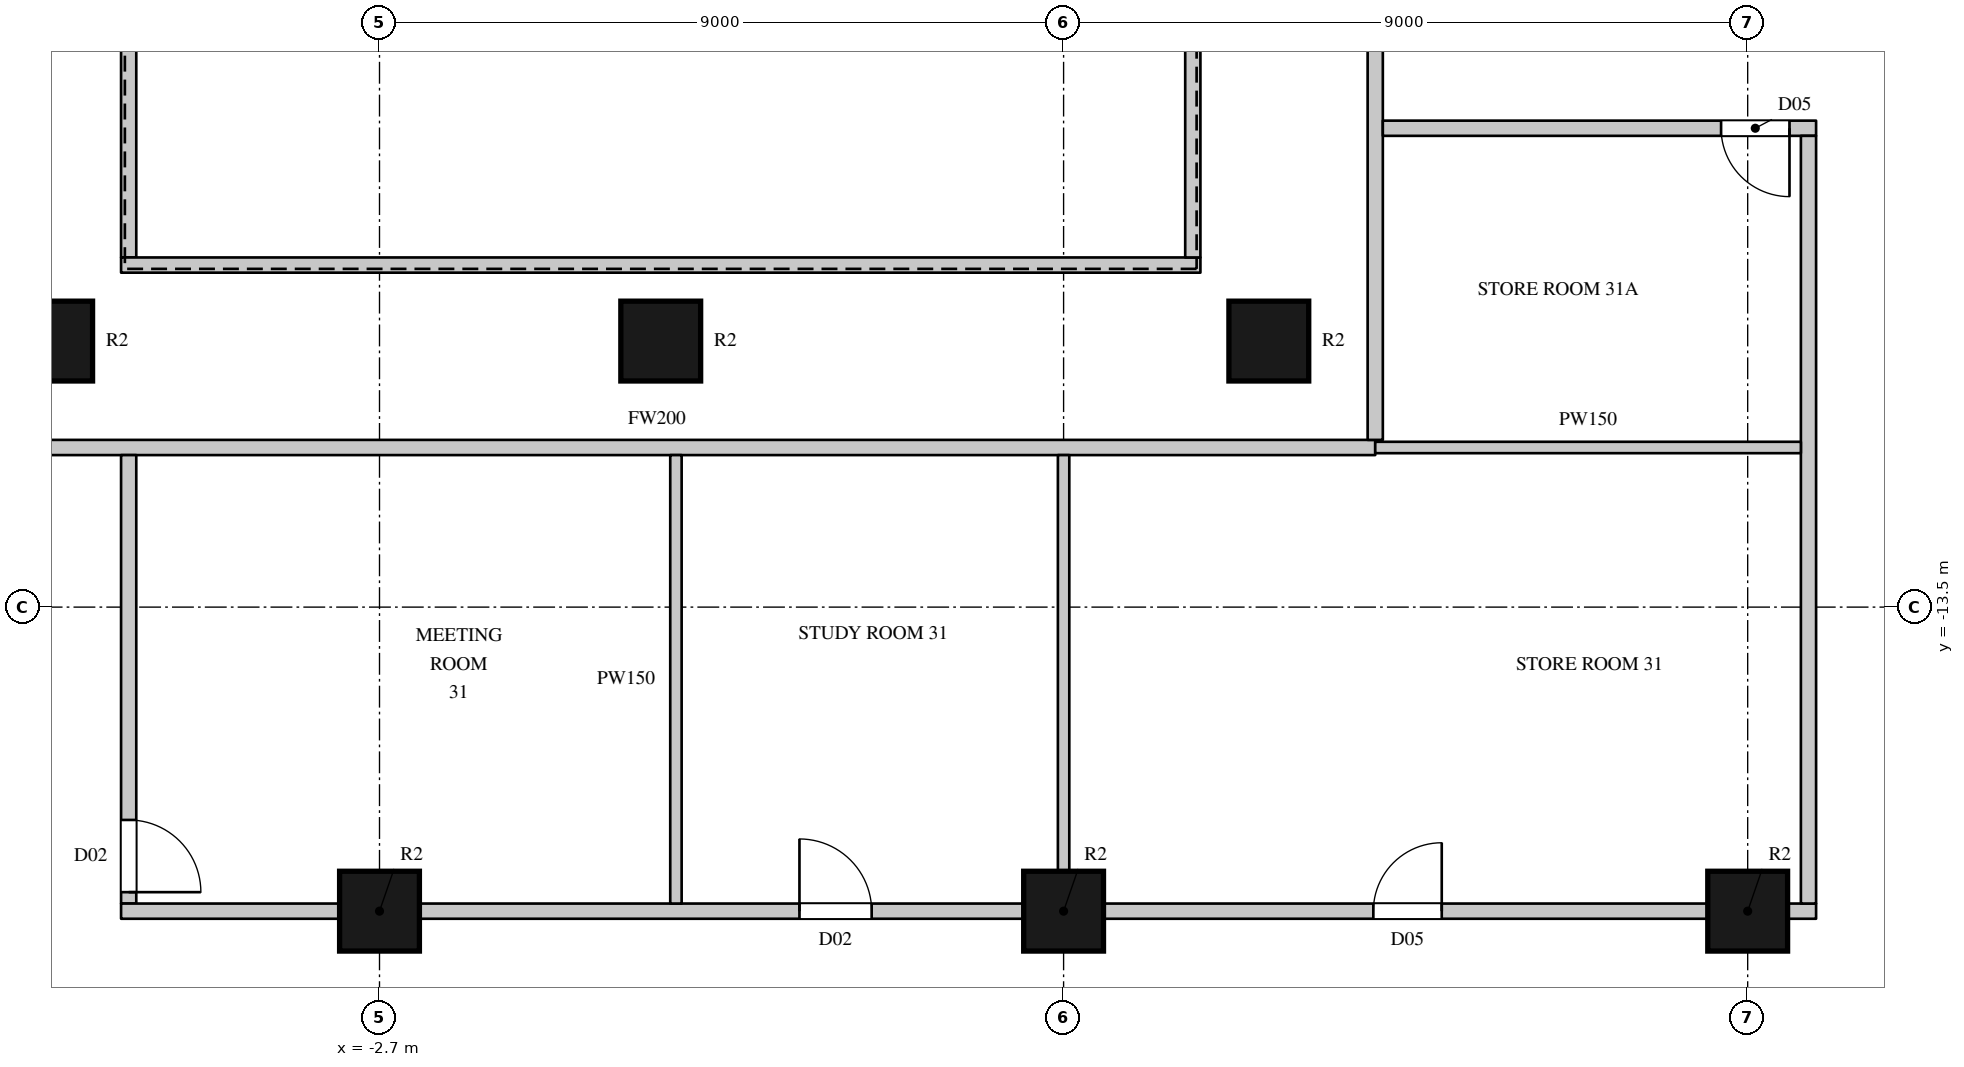
"""IFC4 building model, lengths in metres.
Left out: names, types, materials, properties, quantities, classifications, styles, units other than length and angle.
Written with IfcOpenShell. Run it as: python <this file> out.ifc"""

import sys

from ifc_helpers import new_model, si_unit, direction, frame, frame_2d, origin, origin_2d, place, context, subcontext, project, spatial, rectangle, circle, extrude, element, fill, save


model = new_model("IFC4")
c1 = context("Model", 3, precision=1e-05, world=origin(), true_north=direction((0.0, 1.0)))
c2 = subcontext(c1, "Body", "Model", "MODEL_VIEW")
j1 = project(units=[si_unit("LENGTHUNIT", "METRE"), si_unit("PLANEANGLEUNIT", "RADIAN")], contexts=[c1])
p1 = place(None, origin())
s1 = spatial("IfcSite", under=j1, at=p1, CompositionType="ELEMENT")
p2 = place(p1, origin())
s2 = spatial("IfcBuilding", under=s1, at=p2, CompositionType="ELEMENT")
p3 = place(p2, frame((0.0, 0.0, 141.9)))
s3 = spatial("IfcBuildingStorey", under=s2, at=p3, CompositionType="ELEMENT", Elevation=141.9)
for number, where, z_axis, x_axis in (
    (1, (-2.7, -17.5, 0.0), (0.0, 0.0, 1.0), (1.0, 0.0, 0.0)),
    (2, (6.3, -17.5, 0.0), (0.0, 0.0, 1.0), (1.0, 0.0, 0.0)),
    (3, (15.3, -17.5, 0.0), (0.0, 0.0, 1.0), (1.0, 0.0, 0.0)),
    (4, (-7.0, -10.0, 0.0), (0.0, 0.0, 1.0), (1.0, 0.0, 0.0)),
    (5, (1.0, -10.0, 0.0), (0.0, 0.0, 1.0), (1.0, 0.0, 0.0)),
    (6, (9.0, -10.0, 0.0), (0.0, 0.0, 1.0), (1.0, 0.0, 0.0)),
):
    element("IfcColumn", number, at=place(p3, frame(where, z_axis=z_axis, x_axis=x_axis)), inside=s3, PredefinedType="COLUMN", context=c2, shape_type="SweptSolid", body=[
        extrude(circle(Radius=0.525, at=origin_2d()), origin(), (0.0, 0.0, 1.0), 3.6),
    ])
p4 = place(p3, frame((-8.5, -11.4, 0.0), z_axis=(0.0, 0.0, 1.0), x_axis=(1.0, 0.0, 0.0)))
e7 = element("IfcWall", 7, at=p4, inside=s3, PredefinedType="PARTITIONING", context=c2, shape_type="SweptSolid", body=[
    extrude(rectangle(XDim=18.9, YDim=0.2, at=frame_2d((9.45, 0.0))), origin(), (0.0, 0.0, 1.0), 3.3),
])
p5 = place(p3, frame((-6.0, -17.4, 0.0), z_axis=(0.0, 0.0, 1.0), x_axis=(0.0, 1.0, 0.0)))
e8 = element("IfcWall", 8, at=p5, inside=s3, PredefinedType="PARTITIONING", context=c2, shape_type="SweptSolid", body=[
    extrude(rectangle(XDim=5.9, YDim=0.2, at=frame_2d((2.95, 0.0))), origin(), (0.0, 0.0, 1.0), 3.3),
])
p6 = place(p5, frame((0.15, 0.0, 0.0)))
e9 = element("IfcOpeningElement", 9, at=p6, cuts=e8, PredefinedType="OPENING", context=c2, shape_type="SweptSolid", body=[
    extrude(rectangle(XDim=0.95, YDim=2.2, at=frame_2d((0.475, 1.1))), frame((0.0, 0.11, 0.0), z_axis=(0.0, -1.0, 0.0), x_axis=(1.0, 0.0, 0.0)), (0.0, 0.0, 1.0), 0.22),
])
p7 = place(p3, frame((-6.1, -17.5, 0.0), z_axis=(0.0, 0.0, 1.0), x_axis=(1.0, 0.0, 0.0)))
e10 = element("IfcWall", 10, at=p7, inside=s3, PredefinedType="PARTITIONING", context=c2, shape_type="SweptSolid", body=[
    extrude(rectangle(XDim=2.875, YDim=0.2, at=frame_2d((1.438, 0.0))), origin(), (0.0, 0.0, 1.0), 2.75),
])
p8 = place(p3, frame((-2.175, -17.5, 0.0), z_axis=(0.0, 0.0, 1.0), x_axis=(1.0, 0.0, 0.0)))
e11 = element("IfcWall", 11, at=p8, inside=s3, PredefinedType="PARTITIONING", context=c2, shape_type="SweptSolid", body=[
    extrude(rectangle(XDim=7.95, YDim=0.2, at=frame_2d((3.975, 0.0))), origin(), (0.0, 0.0, 1.0), 2.75),
])
p9 = place(p8, frame((5.0, 0.0, 0.0)))
e12 = element("IfcOpeningElement", 12, at=p9, cuts=e11, PredefinedType="OPENING", context=c2, shape_type="SweptSolid", body=[
    extrude(rectangle(XDim=0.95, YDim=2.2, at=frame_2d((0.475, 1.1))), frame((0.0, 0.11, 0.0), z_axis=(0.0, -1.0, 0.0), x_axis=(1.0, 0.0, 0.0)), (0.0, 0.0, 1.0), 0.22),
])
p10 = place(p3, frame((6.825, -17.5, 0.0), z_axis=(0.0, 0.0, 1.0), x_axis=(1.0, 0.0, 0.0)))
e13 = element("IfcWall", 13, at=p10, inside=s3, PredefinedType="PARTITIONING", context=c2, shape_type="SweptSolid", body=[
    extrude(rectangle(XDim=7.95, YDim=0.2, at=frame_2d((3.975, 0.0))), origin(), (0.0, 0.0, 1.0), 2.75),
])
p11 = place(p10, frame((3.55, 0.0, 0.0)))
e14 = element("IfcOpeningElement", 14, at=p11, cuts=e13, PredefinedType="OPENING", context=c2, shape_type="SweptSolid", body=[
    extrude(rectangle(XDim=0.9, YDim=2.2, at=frame_2d((0.45, 1.1))), frame((0.0, 0.11, 0.0), z_axis=(0.0, -1.0, 0.0), x_axis=(1.0, 0.0, 0.0)), (0.0, 0.0, 1.0), 0.22),
])
p12 = place(p3, frame((15.825, -17.5, 0.0), z_axis=(0.0, 0.0, 1.0), x_axis=(1.0, 0.0, 0.0)))
e15 = element("IfcWall", 15, at=p12, inside=s3, PredefinedType="PARTITIONING", context=c2, shape_type="SweptSolid", body=[
    extrude(rectangle(XDim=0.375, YDim=0.2, at=frame_2d((0.188, 0.0))), origin(), (0.0, 0.0, 1.0), 3.3),
])
p13 = place(p3, frame((-6.0, -8.9, 0.0), z_axis=(0.0, 0.0, 1.0), x_axis=(0.0, 1.0, 0.0)))
e16 = element("IfcWall", 16, at=p13, inside=s3, PredefinedType="PARTITIONING", context=c2, shape_type="SweptSolid", body=[
    extrude(rectangle(XDim=17.8, YDim=0.2, at=frame_2d((8.9, 0.0))), origin(), (0.0, 0.0, 1.0), 3.3),
])
p14 = place(p3, frame((-6.1, -9.0, 0.0), z_axis=(0.0, 0.0, 1.0), x_axis=(1.0, 0.0, 0.0)))
e17 = element("IfcWall", 17, at=p14, inside=s3, PredefinedType="PARTITIONING", context=c2, shape_type="SweptSolid", body=[
    extrude(rectangle(XDim=14.2, YDim=0.2, at=frame_2d((7.1, 0.0))), origin(), (0.0, 0.0, 1.0), 3.3),
])
p15 = place(p3, frame((8.0, -8.9, 0.0), z_axis=(0.0, 0.0, 1.0), x_axis=(0.0, 1.0, 0.0)))
e18 = element("IfcWall", 18, at=p15, inside=s3, PredefinedType="PARTITIONING", context=c2, shape_type="SweptSolid", body=[
    extrude(rectangle(XDim=17.8, YDim=0.2, at=frame_2d((8.9, 0.0))), origin(), (0.0, 0.0, 1.0), 3.3),
])
p16 = place(p3, frame((10.4, -11.3, 0.0), z_axis=(0.0, 0.0, 1.0), x_axis=(0.0, 1.0, 0.0)))
e19 = element("IfcWall", 19, at=p16, inside=s3, PredefinedType="PARTITIONING", context=c2, shape_type="SweptSolid", body=[
    extrude(rectangle(XDim=18.045, YDim=0.2, at=frame_2d((9.022, 0.0))), origin(), (0.0, 0.0, 1.0), 3.3),
])
p17 = place(p16, frame((16.3, 0.0, 0.0)))
e20 = element("IfcOpeningElement", 20, at=p17, cuts=e19, PredefinedType="OPENING", context=c2, shape_type="SweptSolid", body=[
    extrude(rectangle(XDim=1.5, YDim=2.2, at=frame_2d((0.75, 1.1))), frame((0.0, 0.11, 0.0), z_axis=(0.0, -1.0, 0.0), x_axis=(1.0, 0.0, 0.0)), (0.0, 0.0, 1.0), 0.22),
])
p18 = place(p16, frame((14.65, 0.0, 0.0)))
e21 = element("IfcOpeningElement", 21, at=p18, cuts=e19, PredefinedType="OPENING", context=c2, shape_type="SweptSolid", body=[
    extrude(rectangle(XDim=1.5, YDim=2.2, at=frame_2d((0.75, 1.1))), frame((0.0, 0.11, 0.0), z_axis=(0.0, -1.0, 0.0), x_axis=(1.0, 0.0, 0.0)), (0.0, 0.0, 1.0), 0.22),
])
p19 = place(p16, frame((9.1, 0.0, 0.0)))
e22 = element("IfcOpeningElement", 22, at=p19, cuts=e19, PredefinedType="OPENING", context=c2, shape_type="SweptSolid", body=[
    extrude(rectangle(XDim=1.5, YDim=2.2, at=frame_2d((0.75, 1.1))), frame((0.0, 0.11, 0.0), z_axis=(0.0, -1.0, 0.0), x_axis=(1.0, 0.0, 0.0)), (0.0, 0.0, 1.0), 0.22),
])
p20 = place(p3, frame((10.5, -7.2, 0.0), z_axis=(0.0, 0.0, 1.0), x_axis=(1.0, 0.0, 0.0)))
e23 = element("IfcWall", 23, at=p20, inside=s3, PredefinedType="PARTITIONING", context=c2, shape_type="SweptSolid", body=[
    extrude(rectangle(XDim=5.7, YDim=0.2, at=frame_2d((2.85, 0.0))), origin(), (0.0, 0.0, 1.0), 3.3),
])
p21 = place(p20, frame((4.45, 0.0, 0.0)))
e24 = element("IfcOpeningElement", 24, at=p21, cuts=e23, PredefinedType="OPENING", context=c2, shape_type="SweptSolid", body=[
    extrude(rectangle(XDim=0.9, YDim=2.2, at=frame_2d((0.45, 1.1))), frame((0.0, 0.11, 0.0), z_axis=(0.0, -1.0, 0.0), x_axis=(1.0, 0.0, 0.0)), (0.0, 0.0, 1.0), 0.22),
])
p22 = place(p3, frame((16.1, -17.4, 0.0), z_axis=(0.0, 0.0, 1.0), x_axis=(0.0, 1.0, 0.0)))
e25 = element("IfcWall", 25, at=p22, inside=s3, PredefinedType="PARTITIONING", context=c2, shape_type="SweptSolid", body=[
    extrude(rectangle(XDim=10.1, YDim=0.2, at=frame_2d((5.05, 0.0))), origin(), (0.0, 0.0, 1.0), 3.3),
])
p23 = place(p3, frame((1.2, -17.4, 0.0), z_axis=(0.0, 0.0, 1.0), x_axis=(0.0, 1.0, 0.0)))
e26 = element("IfcWall", 26, at=p23, inside=s3, PredefinedType="PARTITIONING", context=c2, shape_type="SweptSolid", body=[
    extrude(rectangle(XDim=5.9, YDim=0.15, at=frame_2d((2.95, 0.0))), origin(), (0.0, 0.0, 1.0), 3.3),
])
p24 = place(p3, frame((6.3, -16.975, 0.0), z_axis=(0.0, 0.0, 1.0), x_axis=(0.0, 1.0, 0.0)))
e27 = element("IfcWall", 27, at=p24, inside=s3, PredefinedType="PARTITIONING", context=c2, shape_type="SweptSolid", body=[
    extrude(rectangle(XDim=5.475, YDim=0.15, at=frame_2d((2.738, 0.0))), origin(), (0.0, 0.0, 1.0), 2.75),
])
p25 = place(p3, frame((10.4, -11.4, 0.0), z_axis=(0.0, 0.0, 1.0), x_axis=(1.0, 0.0, 0.0)))
e28 = element("IfcWall", 28, at=p25, inside=s3, PredefinedType="PARTITIONING", context=c2, shape_type="SweptSolid", body=[
    extrude(rectangle(XDim=5.6, YDim=0.15, at=frame_2d((2.8, 0.0))), origin(), (0.0, 0.0, 1.0), 3.3),
])
p26 = place(p6, origin())
e29 = element("IfcDoor", 29, at=p26, inside=s3, OperationType="SINGLE_SWING_RIGHT", PredefinedType="DOOR", context=c2, shape_type="SweptSolid", body=[
    extrude(rectangle(XDim=0.95, YDim=2.2, at=frame_2d((0.475, 1.1))), frame((0.0, 0.025, 0.0), z_axis=(0.0, -1.0, 0.0), x_axis=(1.0, 0.0, 0.0)), (0.0, 0.0, 1.0), 0.05),
])
fill(e9, e29)
p27 = place(p9, origin())
e30 = element("IfcDoor", 30, at=p27, inside=s3, OperationType="SINGLE_SWING_LEFT", PredefinedType="DOOR", context=c2, shape_type="SweptSolid", body=[
    extrude(rectangle(XDim=0.95, YDim=2.2, at=frame_2d((0.475, 1.1))), frame((0.0, 0.025, 0.0), z_axis=(0.0, -1.0, 0.0), x_axis=(1.0, 0.0, 0.0)), (0.0, 0.0, 1.0), 0.05),
])
fill(e12, e30)
p28 = place(p11, origin())
e31 = element("IfcDoor", 31, at=p28, inside=s3, OperationType="SINGLE_SWING_RIGHT", PredefinedType="DOOR", context=c2, shape_type="SweptSolid", body=[
    extrude(rectangle(XDim=0.9, YDim=2.2, at=frame_2d((0.45, 1.1))), frame((0.0, 0.025, 0.0), z_axis=(0.0, -1.0, 0.0), x_axis=(1.0, 0.0, 0.0)), (0.0, 0.0, 1.0), 0.05),
])
fill(e14, e31)
p29 = place(p21, origin())
e32 = element("IfcDoor", 32, at=p29, inside=s3, OperationType="SINGLE_SWING_LEFT", PredefinedType="DOOR", context=c2, shape_type="SweptSolid", body=[
    extrude(rectangle(XDim=0.9, YDim=2.2, at=frame_2d((0.45, 1.1))), frame((0.0, 0.025, 0.0), z_axis=(0.0, -1.0, 0.0), x_axis=(1.0, 0.0, 0.0)), (0.0, 0.0, 1.0), 0.05),
])
fill(e24, e32)
save(model, sys.argv[1])
